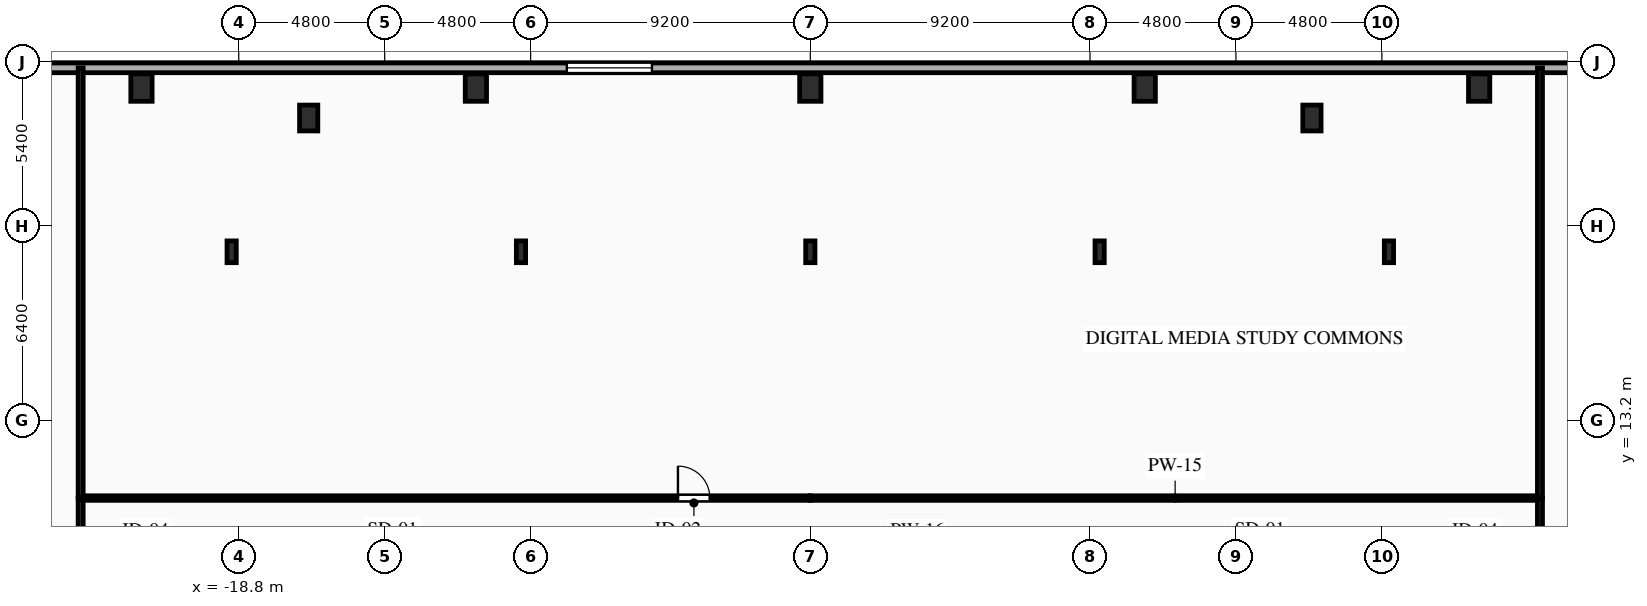
"""IFC4 building model, lengths in metres.
Left out: names, types, materials, properties, quantities, classifications, styles, units other than length and angle.
Written with IfcOpenShell. Run it as: python <this file> out.ifc"""

import sys

from ifc_helpers import new_model, si_unit, direction, frame, frame_2d, origin, origin_2d, place, context, subcontext, project, spatial, rectangle, i_section, extrude, element, fill, save


model = new_model("IFC4")
c1 = context("Model", 3, precision=1e-05, world=origin(), true_north=direction((0.0, 1.0)))
c2 = subcontext(c1, "Body", "Model", "MODEL_VIEW")
j1 = project(units=[si_unit("LENGTHUNIT", "METRE"), si_unit("PLANEANGLEUNIT", "RADIAN")], contexts=[c1])
p1 = place(None, origin())
s1 = spatial("IfcSite", under=j1, at=p1, CompositionType="ELEMENT")
p2 = place(p1, origin())
s2 = spatial("IfcBuilding", under=s1, at=p2, CompositionType="ELEMENT")
p3 = place(p2, frame((0.0, 0.0, 4.5)))
s3 = spatial("IfcBuildingStorey", under=s2, at=p3, CompositionType="ELEMENT", Elevation=4.5)
for number, where, z_axis, x_axis in (
    (1, (-22.0, 24.15, 0.0), (0.0, 0.0, 1.0), (1.0, 0.0, 0.0)),
    (2, (-11.0, 24.15, 0.0), (0.0, 0.0, 1.0), (1.0, 0.0, 0.0)),
    (3, (0.0, 24.15, 0.0), (0.0, 0.0, 1.0), (1.0, 0.0, 0.0)),
    (4, (11.0, 24.15, 0.0), (0.0, 0.0, 1.0), (1.0, 0.0, 0.0)),
    (5, (22.0, 24.15, 0.0), (0.0, 0.0, 1.0), (1.0, 0.0, 0.0)),
):
    element("IfcColumn", number, at=place(p3, frame(where, z_axis=z_axis, x_axis=x_axis)), inside=s3, PredefinedType="COLUMN", context=c2, shape_type="SweptSolid", body=[
        extrude(rectangle(XDim=0.7, YDim=0.9, at=origin_2d()), origin(), (0.0, 0.0, 1.0), 4.5),
    ])
for number, where, z_axis, x_axis in (
    (6, (-16.5, 23.15, 0.0), (0.0, 0.0, 1.0), (1.0, 0.0, 0.0)),
    (7, (16.5, 23.15, 0.0), (0.0, 0.0, 1.0), (1.0, 0.0, 0.0)),
):
    element("IfcColumn", number, at=place(p3, frame(where, z_axis=z_axis, x_axis=x_axis)), inside=s3, PredefinedType="PILASTER", context=c2, shape_type="SweptSolid", body=[
        extrude(rectangle(XDim=0.6, YDim=0.85, at=origin_2d()), origin(), (0.0, 0.0, 1.0), 4.5),
    ])
for number, where, z_axis, x_axis in (
    (8, (19.033, 18.75, 0.0), (0.0, 0.0, 1.0), (1.0, 0.0, 0.0)),
    (9, (9.517, 18.75, 0.0), (0.0, 0.0, 1.0), (1.0, 0.0, 0.0)),
    (10, (0.0, 18.75, 0.0), (0.0, 0.0, 1.0), (1.0, 0.0, 0.0)),
    (11, (-9.517, 18.75, 0.0), (0.0, 0.0, 1.0), (1.0, 0.0, 0.0)),
    (12, (-19.033, 18.75, 0.0), (0.0, 0.0, 1.0), (1.0, 0.0, 0.0)),
):
    element("IfcColumn", number, at=place(p3, frame(where, z_axis=z_axis, x_axis=x_axis)), inside=s3, PredefinedType="COLUMN", context=c2, shape_type="SweptSolid", body=[
        extrude(i_section(OverallWidth=0.304, OverallDepth=0.716, WebThickness=0.021, FlangeThickness=0.04, FilletRadius=0.027, at=origin_2d()), origin(), (0.0, 0.0, 1.0), 4.5),
    ])
p4 = place(p3, frame((-38.3, 24.8, 0.0), z_axis=(0.0, 0.0, 1.0), x_axis=(1.0, 0.0, 0.0)))
e13 = element("IfcWall", 13, at=p4, inside=s3, PredefinedType="SOLIDWALL", context=c2, shape_type="SweptSolid", body=[
    extrude(rectangle(XDim=76.6, YDim=0.32, at=frame_2d((38.3, 0.0))), origin(), (0.0, 0.0, 1.0), 4.17),
])
p5 = place(p4, frame((6.004, 0.0, 0.85)))
e14 = element("IfcOpeningElement", 14, at=p5, cuts=e13, PredefinedType="OPENING", context=c2, shape_type="SweptSolid", body=[
    extrude(rectangle(XDim=2.8, YDim=2.4, at=frame_2d((1.4, 1.2))), frame((0.0, 0.17, 0.0), z_axis=(0.0, -1.0, 0.0), x_axis=(1.0, 0.0, 0.0)), (0.0, 0.0, 1.0), 0.34),
])
p6 = place(p4, frame((30.291, 0.0, 0.85)))
e15 = element("IfcOpeningElement", 15, at=p6, cuts=e13, PredefinedType="OPENING", context=c2, shape_type="SweptSolid", body=[
    extrude(rectangle(XDim=2.8, YDim=2.4, at=frame_2d((1.4, 1.2))), frame((0.0, 0.17, 0.0), z_axis=(0.0, -1.0, 0.0), x_axis=(1.0, 0.0, 0.0)), (0.0, 0.0, 1.0), 0.34),
])
p7 = place(p4, frame((67.876, 0.0, 0.85)))
e16 = element("IfcOpeningElement", 16, at=p7, cuts=e13, PredefinedType="OPENING", context=c2, shape_type="SweptSolid", body=[
    extrude(rectangle(XDim=2.8, YDim=2.4, at=frame_2d((1.4, 1.2))), frame((0.0, 0.17, 0.0), z_axis=(0.0, -1.0, 0.0), x_axis=(1.0, 0.0, 0.0)), (0.0, 0.0, 1.0), 0.34),
])
p8 = place(p3, frame((-24.0, 8.5, 0.0), z_axis=(0.0, 0.0, 1.0), x_axis=(0.0, 1.0, 0.0)))
e17 = element("IfcWall", 17, at=p8, inside=s3, PredefinedType="PARTITIONING", context=c2, shape_type="SweptSolid", body=[
    extrude(rectangle(XDim=2.15, YDim=0.165, at=frame_2d((1.075, 0.0))), origin(), (0.0, 0.0, 1.0), 4.17),
])
p9 = place(p3, frame((-24.0, 10.65, 0.0), z_axis=(0.0, 0.0, 1.0), x_axis=(1.0, 0.0, 0.0)))
e18 = element("IfcWall", 18, at=p9, inside=s3, PredefinedType="PARTITIONING", context=c2, shape_type="SweptSolid", body=[
    extrude(rectangle(XDim=24.0, YDim=0.15, at=frame_2d((12.0, 0.0))), origin(), (0.0, 0.0, 1.0), 4.17),
])
p10 = place(p9, frame((19.646, 0.0, 0.0)))
e19 = element("IfcOpeningElement", 19, at=p10, cuts=e18, PredefinedType="OPENING", context=c2, shape_type="SweptSolid", body=[
    extrude(rectangle(XDim=1.05, YDim=2.15, at=frame_2d((0.525, 1.075))), frame((0.0, 0.085, 0.0), z_axis=(0.0, -1.0, 0.0), x_axis=(1.0, 0.0, 0.0)), (0.0, 0.0, 1.0), 0.17),
])
p11 = place(p3, frame((0.0, 10.65, 0.0), z_axis=(0.0, 0.0, 1.0), x_axis=(1.0, 0.0, 0.0)))
e20 = element("IfcWall", 20, at=p11, inside=s3, PredefinedType="PARTITIONING", context=c2, shape_type="SweptSolid", body=[
    extrude(rectangle(XDim=24.0, YDim=0.15, at=frame_2d((12.0, 0.0))), origin(), (0.0, 0.0, 1.0), 4.17),
])
p12 = place(p3, frame((24.0, 10.65, 0.0), z_axis=(0.0, 0.0, 1.0), x_axis=(0.0, -1.0, 0.0)))
e21 = element("IfcWall", 21, at=p12, inside=s3, PredefinedType="PARTITIONING", context=c2, shape_type="SweptSolid", body=[
    extrude(rectangle(XDim=2.15, YDim=0.165, at=frame_2d((1.075, 0.0))), origin(), (0.0, 0.0, 1.0), 4.17),
])
for number, where, z_axis, x_axis in (
    (22, (-24.0, 24.8, 0.0), (0.0, 0.0, 1.0), (0.0, -1.0, 0.0)),
    (23, (24.0, 24.8, 0.0), (0.0, 0.0, 1.0), (0.0, -1.0, 0.0)),
):
    element("IfcWall", number, at=place(p3, frame(where, z_axis=z_axis, x_axis=x_axis)), inside=s3, PredefinedType="PARTITIONING", context=c2, shape_type="SweptSolid", body=[
        extrude(rectangle(XDim=14.15, YDim=0.165, at=frame_2d((7.075, 0.0))), origin(), (0.0, 0.0, 1.0), 4.17),
    ])
p13 = place(p6, origin())
e24 = element("IfcWindow", 24, at=p13, inside=s3, PartitioningType="SINGLE_PANEL", PredefinedType="WINDOW", context=c2, shape_type="SweptSolid", body=[
    extrude(rectangle(XDim=2.8, YDim=2.4, at=frame_2d((1.4, 1.2))), frame((0.0, 0.03, 0.0), z_axis=(0.0, -1.0, 0.0), x_axis=(1.0, 0.0, 0.0)), (0.0, 0.0, 1.0), 0.06),
])
fill(e15, e24)
p14 = place(p10, origin())
e25 = element("IfcDoor", 25, at=p14, inside=s3, OperationType="SINGLE_SWING_LEFT", PredefinedType="DOOR", context=c2, shape_type="SweptSolid", body=[
    extrude(rectangle(XDim=1.05, YDim=2.15, at=frame_2d((0.525, 1.075))), frame((0.0, 0.025, 0.0), z_axis=(0.0, -1.0, 0.0), x_axis=(1.0, 0.0, 0.0)), (0.0, 0.0, 1.0), 0.05),
])
fill(e19, e25)
save(model, sys.argv[1])
